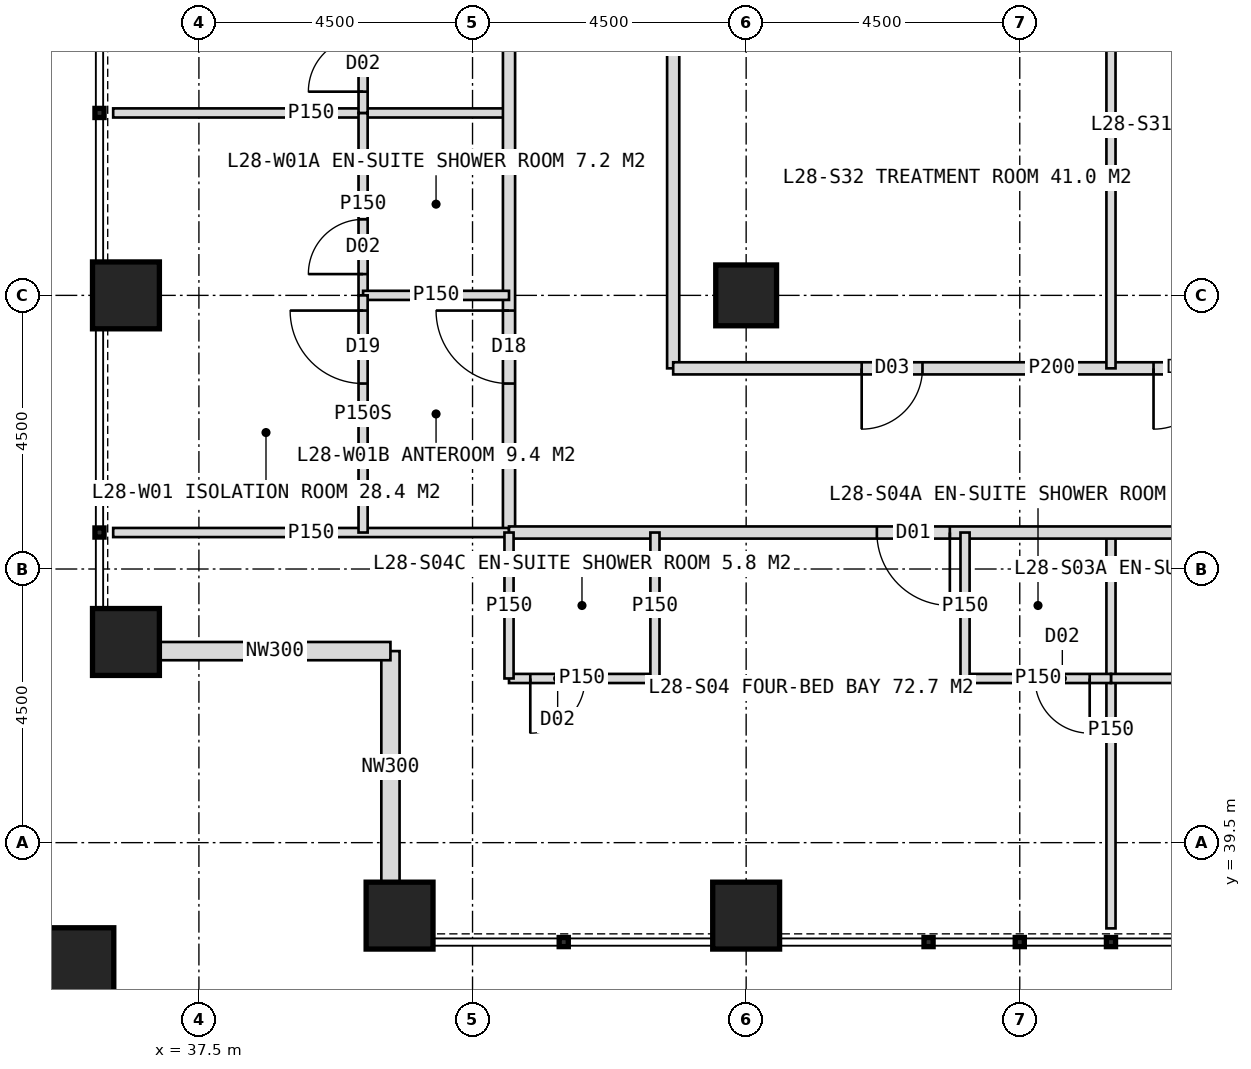
"""IFC4 building model, lengths in metres.
Left out: names, types, materials, properties, quantities, classifications, styles, units other than length and angle.
Written with IfcOpenShell. Run it as: python <this file> out.ifc"""

import sys

from ifc_helpers import new_model, si_unit, direction, frame, frame_2d, origin, origin_2d, place, context, subcontext, project, spatial, rectangle, hollow_rectangle, extrude, element, fill, save


model = new_model("IFC4")
c1 = context("Model", 3, precision=1e-05, world=origin(), true_north=direction((0.0, 1.0)))
c2 = subcontext(c1, "Body", "Model", "MODEL_VIEW")
j1 = project(units=[si_unit("LENGTHUNIT", "METRE"), si_unit("PLANEANGLEUNIT", "RADIAN")], contexts=[c1])
p1 = place(None, origin())
s1 = spatial("IfcSite", under=j1, at=p1, CompositionType="ELEMENT")
p2 = place(p1, origin())
s2 = spatial("IfcBuilding", under=s1, at=p2, CompositionType="ELEMENT")
p3 = place(p2, frame((0.0, 0.0, 120.0)))
s3 = spatial("IfcBuildingStorey", under=s2, at=p3, CompositionType="ELEMENT", Elevation=120.0)
p4 = place(p3, frame((46.5, 48.5, 0.0), z_axis=(0.0, 0.0, 1.0), x_axis=(1.0, 0.0, 0.0)))
e1 = element("IfcColumn", 1, at=p4, inside=s3, PredefinedType="COLUMN", context=c2, shape_type="SweptSolid", body=[
    extrude(hollow_rectangle(XDim=1.0, YDim=1.0, WallThickness=0.1, at=origin_2d()), origin(), (0.0, 0.0, 1.0), 4.0),
])
for number, where, z_axis, x_axis in (
    (2, (40.8, 38.3, 0.0), (0.0, 0.0, 1.0), (1.0, 0.0, 0.0)),
    (3, (36.3, 42.8, 0.0), (0.0, 0.0, 1.0), (1.0, 0.0, 0.0)),
    (4, (46.5, 38.3, 0.0), (0.0, 0.0, 1.0), (1.0, 0.0, 0.0)),
    (5, (36.3, 48.5, 0.0), (0.0, 0.0, 1.0), (1.0, 0.0, 0.0)),
):
    element("IfcColumn", number, at=place(p3, frame(where, z_axis=z_axis, x_axis=x_axis)), inside=s3, PredefinedType="COLUMN", context=c2, shape_type="SweptSolid", body=[
        extrude(hollow_rectangle(XDim=1.1, YDim=1.1, WallThickness=0.1, at=origin_2d()), origin(), (0.0, 0.0, 1.0), 4.0),
    ])
p5 = place(p3, frame((35.4, 37.4, 0.0), z_axis=(0.0, 0.0, 1.0), x_axis=(1.0, 0.0, 0.0)))
e6 = element("IfcColumn", 6, at=p5, inside=s3, PredefinedType="COLUMN", context=c2, shape_type="SweptSolid", body=[
    extrude(hollow_rectangle(XDim=1.4, YDim=1.4, WallThickness=0.08, at=origin_2d()), origin(), (0.0, 0.0, 1.0), 4.0),
])
for number, where, z_axis, x_axis in (
    (7, (40.65, 38.85, 0.0), (0.0, 0.0, 1.0), (0.0, 1.0, 0.0)),
    (8, (40.65, 42.65, 0.0), (0.0, 0.0, 1.0), (-1.0, 0.0, 0.0)),
):
    element("IfcWall", number, at=place(p3, frame(where, z_axis=z_axis, x_axis=x_axis)), inside=s3, PredefinedType="ELEMENTEDWALL", context=c2, shape_type="SweptSolid", body=[
        extrude(rectangle(XDim=3.8, YDim=0.3, at=frame_2d((1.9, 0.0))), origin(), (0.0, 0.0, 1.0), 4.0),
    ])
p6 = place(p3, frame((42.6, 51.5, 0.0), z_axis=(0.0, 0.0, 1.0), x_axis=(-1.0, 0.0, 0.0)))
e9 = element("IfcWall", 9, at=p6, inside=s3, PredefinedType="PARTITIONING", context=c2, shape_type="SweptSolid", body=[
    extrude(rectangle(XDim=6.51, YDim=0.15, at=frame_2d((3.255, 0.0))), origin(), (0.0, 0.0, 1.0), 3.75),
])
p7 = place(p3, frame((42.6, 44.6, 0.0), z_axis=(0.0, 0.0, 1.0), x_axis=(0.0, 1.0, 0.0)))
e10 = element("IfcWall", 10, at=p7, inside=s3, PredefinedType="PARTITIONING", context=c2, shape_type="SweptSolid", body=[
    extrude(rectangle(XDim=34.8, YDim=0.2, at=frame_2d((17.4, 0.0))), origin(), (0.0, 0.0, 1.0), 3.75),
])
p8 = place(p7, frame((2.45, 0.0, 0.0)))
e11 = element("IfcOpeningElement", 11, at=p8, cuts=e10, PredefinedType="OPENING", context=c2, shape_type="SweptSolid", body=[
    extrude(rectangle(XDim=1.2, YDim=2.2, at=frame_2d((0.6, 1.1))), frame((0.0, 0.11, 0.0), z_axis=(0.0, -1.0, 0.0), x_axis=(1.0, 0.0, 0.0)), (0.0, 0.0, 1.0), 0.22),
])
p9 = place(p7, frame((10.15, 0.0, 0.0)))
e12 = element("IfcOpeningElement", 12, at=p9, cuts=e10, PredefinedType="OPENING", context=c2, shape_type="SweptSolid", body=[
    extrude(rectangle(XDim=1.2, YDim=2.2, at=frame_2d((0.6, 1.1))), frame((0.0, 0.11, 0.0), z_axis=(0.0, -1.0, 0.0), x_axis=(1.0, 0.0, 0.0)), (0.0, 0.0, 1.0), 0.22),
])
p10 = place(p7, frame((23.45, 0.0, 0.0)))
e13 = element("IfcOpeningElement", 13, at=p10, cuts=e10, PredefinedType="OPENING", context=c2, shape_type="SweptSolid", body=[
    extrude(rectangle(XDim=1.2, YDim=2.2, at=frame_2d((0.6, 1.1))), frame((0.0, 0.11, 0.0), z_axis=(0.0, -1.0, 0.0), x_axis=(1.0, 0.0, 0.0)), (0.0, 0.0, 1.0), 0.22),
])
p11 = place(p7, frame((30.55, 0.0, 0.0)))
e14 = element("IfcOpeningElement", 14, at=p11, cuts=e10, PredefinedType="OPENING", context=c2, shape_type="SweptSolid", body=[
    extrude(rectangle(XDim=1.2, YDim=2.2, at=frame_2d((0.6, 1.1))), frame((0.0, 0.11, 0.0), z_axis=(0.0, -1.0, 0.0), x_axis=(1.0, 0.0, 0.0)), (0.0, 0.0, 1.0), 0.22),
])
p12 = place(p3, frame((42.6, 44.6, 0.0), z_axis=(0.0, 0.0, 1.0), x_axis=(-1.0, 0.0, 0.0)))
e15 = element("IfcWall", 15, at=p12, inside=s3, PredefinedType="PARTITIONING", context=c2, shape_type="SweptSolid", body=[
    extrude(rectangle(XDim=6.51, YDim=0.15, at=frame_2d((3.255, 0.0))), origin(), (0.0, 0.0, 1.0), 3.75),
])
p13 = place(p3, frame((40.2, 48.5, 0.0), z_axis=(0.0, 0.0, 1.0), x_axis=(0.0, 1.0, 0.0)))
e16 = element("IfcWall", 16, at=p13, inside=s3, PredefinedType="PARTITIONING", context=c2, shape_type="SweptSolid", body=[
    extrude(rectangle(XDim=3.0, YDim=0.15, at=frame_2d((1.5, 0.0))), origin(), (0.0, 0.0, 1.0), 3.75),
])
p14 = place(p13, frame((0.35, 0.0, 0.0)))
e17 = element("IfcOpeningElement", 17, at=p14, cuts=e16, PredefinedType="OPENING", context=c2, shape_type="SweptSolid", body=[
    extrude(rectangle(XDim=0.9, YDim=2.1, at=frame_2d((0.45, 1.05))), frame((0.0, 0.085, 0.0), z_axis=(0.0, -1.0, 0.0), x_axis=(1.0, 0.0, 0.0)), (0.0, 0.0, 1.0), 0.17),
])
p15 = place(p3, frame((42.6, 48.5, 0.0), z_axis=(0.0, 0.0, 1.0), x_axis=(-1.0, 0.0, 0.0)))
e18 = element("IfcWall", 18, at=p15, inside=s3, PredefinedType="PARTITIONING", context=c2, shape_type="SweptSolid", body=[
    extrude(rectangle(XDim=2.4, YDim=0.15, at=frame_2d((1.2, 0.0))), origin(), (0.0, 0.0, 1.0), 2.95),
])
p16 = place(p3, frame((40.2, 44.6, 0.0), z_axis=(0.0, 0.0, 1.0), x_axis=(0.0, 1.0, 0.0)))
e19 = element("IfcWall", 19, at=p16, inside=s3, PredefinedType="PARTITIONING", context=c2, shape_type="SweptSolid", body=[
    extrude(rectangle(XDim=3.9, YDim=0.15, at=frame_2d((1.95, 0.0))), origin(), (0.0, 0.0, 1.0), 3.75),
])
p17 = place(p16, frame((2.45, 0.0, 0.0)))
e20 = element("IfcOpeningElement", 20, at=p17, cuts=e19, PredefinedType="OPENING", context=c2, shape_type="SweptSolid", body=[
    extrude(rectangle(XDim=1.2, YDim=2.2, at=frame_2d((0.6, 1.1))), frame((0.0, 0.085, 0.0), z_axis=(0.0, -1.0, 0.0), x_axis=(1.0, 0.0, 0.0)), (0.0, 0.0, 1.0), 0.17),
])
p18 = place(p3, frame((40.2, 51.5, 0.0), z_axis=(0.0, 0.0, 1.0), x_axis=(0.0, 1.0, 0.0)))
e21 = element("IfcWall", 21, at=p18, inside=s3, PredefinedType="PARTITIONING", context=c2, shape_type="SweptSolid", body=[
    extrude(rectangle(XDim=3.0, YDim=0.15, at=frame_2d((1.5, 0.0))), origin(), (0.0, 0.0, 1.0), 3.75),
])
p19 = place(p18, frame((0.35, 0.0, 0.0)))
e22 = element("IfcOpeningElement", 22, at=p19, cuts=e21, PredefinedType="OPENING", context=c2, shape_type="SweptSolid", body=[
    extrude(rectangle(XDim=0.9, YDim=2.1, at=frame_2d((0.45, 1.05))), frame((0.0, 0.085, 0.0), z_axis=(0.0, -1.0, 0.0), x_axis=(1.0, 0.0, 0.0)), (0.0, 0.0, 1.0), 0.17),
])
p20 = place(p3, frame((45.3, 47.3, 0.0), z_axis=(0.0, 0.0, 1.0), x_axis=(0.0, 1.0, 0.0)))
e23 = element("IfcWall", 23, at=p20, inside=s3, PredefinedType="PARTITIONING", context=c2, shape_type="SweptSolid", body=[
    extrude(rectangle(XDim=10.7, YDim=0.2, at=frame_2d((5.35, 0.0))), origin(), (0.0, 0.0, 1.0), 3.75),
])
p21 = place(p20, frame((6.5, 0.0, 0.0)))
e24 = element("IfcOpeningElement", 24, at=p21, cuts=e23, PredefinedType="OPENING", context=c2, shape_type="SweptSolid", body=[
    extrude(rectangle(XDim=0.9, YDim=2.1, at=frame_2d((0.45, 1.05))), frame((0.0, 0.11, 0.0), z_axis=(0.0, -1.0, 0.0), x_axis=(1.0, 0.0, 0.0)), (0.0, 0.0, 1.0), 0.22),
])
p22 = place(p20, frame((8.45, 0.0, 0.0)))
e25 = element("IfcOpeningElement", 25, at=p22, cuts=e23, PredefinedType="OPENING", context=c2, shape_type="SweptSolid", body=[
    extrude(rectangle(XDim=0.9, YDim=2.1, at=frame_2d((0.45, 1.05))), frame((0.0, 0.11, 0.0), z_axis=(0.0, -1.0, 0.0), x_axis=(1.0, 0.0, 0.0)), (0.0, 0.0, 1.0), 0.22),
])
p23 = place(p3, frame((52.5, 44.6, 0.0), z_axis=(0.0, 0.0, 1.0), x_axis=(0.0, -1.0, 0.0)))
e26 = element("IfcWall", 26, at=p23, inside=s3, PredefinedType="PARTITIONING", context=c2, shape_type="SweptSolid", body=[
    extrude(rectangle(XDim=6.51, YDim=0.15, at=frame_2d((3.255, 0.0))), origin(), (0.0, 0.0, 1.0), 3.75),
])
p24 = place(p3, frame((77.4, 44.6, 0.0), z_axis=(0.0, 0.0, 1.0), x_axis=(-1.0, 0.0, 0.0)))
e27 = element("IfcWall", 27, at=p24, inside=s3, PredefinedType="PARTITIONING", context=c2, shape_type="SweptSolid", body=[
    extrude(rectangle(XDim=34.8, YDim=0.2, at=frame_2d((17.4, 0.0))), origin(), (0.0, 0.0, 1.0), 3.75),
])
p25 = place(p24, frame((2.45, 0.0, 0.0)))
e28 = element("IfcOpeningElement", 28, at=p25, cuts=e27, PredefinedType="OPENING", context=c2, shape_type="SweptSolid", body=[
    extrude(rectangle(XDim=1.2, YDim=2.2, at=frame_2d((0.6, 1.1))), frame((0.0, 0.11, 0.0), z_axis=(0.0, -1.0, 0.0), x_axis=(1.0, 0.0, 0.0)), (0.0, 0.0, 1.0), 0.22),
])
p26 = place(p24, frame((10.15, 0.0, 0.0)))
e29 = element("IfcOpeningElement", 29, at=p26, cuts=e27, PredefinedType="OPENING", context=c2, shape_type="SweptSolid", body=[
    extrude(rectangle(XDim=1.2, YDim=2.2, at=frame_2d((0.6, 1.1))), frame((0.0, 0.11, 0.0), z_axis=(0.0, -1.0, 0.0), x_axis=(1.0, 0.0, 0.0)), (0.0, 0.0, 1.0), 0.22),
])
p27 = place(p24, frame((20.45, 0.0, 0.0)))
e30 = element("IfcOpeningElement", 30, at=p27, cuts=e27, PredefinedType="OPENING", context=c2, shape_type="SweptSolid", body=[
    extrude(rectangle(XDim=1.2, YDim=2.2, at=frame_2d((0.6, 1.1))), frame((0.0, 0.11, 0.0), z_axis=(0.0, -1.0, 0.0), x_axis=(1.0, 0.0, 0.0)), (0.0, 0.0, 1.0), 0.22),
])
p28 = place(p24, frame((27.55, 0.0, 0.0)))
e31 = element("IfcOpeningElement", 31, at=p28, cuts=e27, PredefinedType="OPENING", context=c2, shape_type="SweptSolid", body=[
    extrude(rectangle(XDim=1.2, YDim=2.2, at=frame_2d((0.6, 1.1))), frame((0.0, 0.11, 0.0), z_axis=(0.0, -1.0, 0.0), x_axis=(1.0, 0.0, 0.0)), (0.0, 0.0, 1.0), 0.22),
])
p29 = place(p3, frame((55.5, 42.2, 0.0), z_axis=(0.0, 0.0, 1.0), x_axis=(-1.0, 0.0, 0.0)))
e32 = element("IfcWall", 32, at=p29, inside=s3, PredefinedType="PARTITIONING", context=c2, shape_type="SweptSolid", body=[
    extrude(rectangle(XDim=3.0, YDim=0.15, at=frame_2d((1.5, 0.0))), origin(), (0.0, 0.0, 1.0), 3.75),
])
p30 = place(p29, frame((0.35, 0.0, 0.0)))
e33 = element("IfcOpeningElement", 33, at=p30, cuts=e32, PredefinedType="OPENING", context=c2, shape_type="SweptSolid", body=[
    extrude(rectangle(XDim=0.9, YDim=2.1, at=frame_2d((0.45, 1.05))), frame((0.0, 0.085, 0.0), z_axis=(0.0, -1.0, 0.0), x_axis=(1.0, 0.0, 0.0)), (0.0, 0.0, 1.0), 0.17),
])
p31 = place(p3, frame((52.5, 42.2, 0.0), z_axis=(0.0, 0.0, 1.0), x_axis=(-1.0, 0.0, 0.0)))
e34 = element("IfcWall", 34, at=p31, inside=s3, PredefinedType="PARTITIONING", context=c2, shape_type="SweptSolid", body=[
    extrude(rectangle(XDim=2.4, YDim=0.15, at=frame_2d((1.2, 0.0))), origin(), (0.0, 0.0, 1.0), 3.75),
])
p32 = place(p31, frame((0.35, 0.0, 0.0)))
e35 = element("IfcOpeningElement", 35, at=p32, cuts=e34, PredefinedType="OPENING", context=c2, shape_type="SweptSolid", body=[
    extrude(rectangle(XDim=0.9, YDim=2.1, at=frame_2d((0.45, 1.05))), frame((0.0, 0.085, 0.0), z_axis=(0.0, -1.0, 0.0), x_axis=(1.0, 0.0, 0.0)), (0.0, 0.0, 1.0), 0.17),
])
p33 = place(p3, frame((50.1, 44.6, 0.0), z_axis=(0.0, 0.0, 1.0), x_axis=(0.0, -1.0, 0.0)))
e36 = element("IfcWall", 36, at=p33, inside=s3, PredefinedType="PARTITIONING", context=c2, shape_type="SweptSolid", body=[
    extrude(rectangle(XDim=2.4, YDim=0.15, at=frame_2d((1.2, 0.0))), origin(), (0.0, 0.0, 1.0), 3.75),
])
p34 = place(p3, frame((45.0, 42.2, 0.0), z_axis=(0.0, 0.0, 1.0), x_axis=(-1.0, 0.0, 0.0)))
e37 = element("IfcWall", 37, at=p34, inside=s3, PredefinedType="PARTITIONING", context=c2, shape_type="SweptSolid", body=[
    extrude(rectangle(XDim=2.4, YDim=0.15, at=frame_2d((1.2, 0.0))), origin(), (0.0, 0.0, 1.0), 3.75),
])
p35 = place(p34, frame((1.15, 0.0, 0.0)))
e38 = element("IfcOpeningElement", 38, at=p35, cuts=e37, PredefinedType="OPENING", context=c2, shape_type="SweptSolid", body=[
    extrude(rectangle(XDim=0.9, YDim=2.1, at=frame_2d((0.45, 1.05))), frame((0.0, 0.085, 0.0), z_axis=(0.0, -1.0, 0.0), x_axis=(1.0, 0.0, 0.0)), (0.0, 0.0, 1.0), 0.17),
])
for number, where, z_axis, x_axis in (
    (39, (45.0, 44.6, 0.0), (0.0, 0.0, 1.0), (0.0, -1.0, 0.0)),
    (40, (42.6, 44.6, 0.0), (0.0, 0.0, 1.0), (0.0, -1.0, 0.0)),
):
    element("IfcWall", number, at=place(p3, frame(where, z_axis=z_axis, x_axis=x_axis)), inside=s3, PredefinedType="PARTITIONING", context=c2, shape_type="SweptSolid", body=[
        extrude(rectangle(XDim=2.4, YDim=0.15, at=frame_2d((1.2, 0.0))), origin(), (0.0, 0.0, 1.0), 3.75),
    ])
p36 = place(p3, frame((57.75, 47.3, 0.0), z_axis=(0.0, 0.0, 1.0), x_axis=(-1.0, 0.0, 0.0)))
e41 = element("IfcWall", 41, at=p36, inside=s3, PredefinedType="PARTITIONING", context=c2, shape_type="SweptSolid", body=[
    extrude(rectangle(XDim=12.45, YDim=0.2, at=frame_2d((6.225, 0.0))), origin(), (0.0, 0.0, 1.0), 3.75),
])
p37 = place(p36, frame((3.55, 0.0, 0.0)))
e42 = element("IfcOpeningElement", 42, at=p37, cuts=e41, PredefinedType="OPENING", context=c2, shape_type="SweptSolid", body=[
    extrude(rectangle(XDim=1.0, YDim=2.1, at=frame_2d((0.5, 1.05))), frame((0.0, 0.11, 0.0), z_axis=(0.0, -1.0, 0.0), x_axis=(1.0, 0.0, 0.0)), (0.0, 0.0, 1.0), 0.22),
])
p38 = place(p36, frame((8.35, 0.0, 0.0)))
e43 = element("IfcOpeningElement", 43, at=p38, cuts=e41, PredefinedType="OPENING", context=c2, shape_type="SweptSolid", body=[
    extrude(rectangle(XDim=1.0, YDim=2.1, at=frame_2d((0.5, 1.05))), frame((0.0, 0.11, 0.0), z_axis=(0.0, -1.0, 0.0), x_axis=(1.0, 0.0, 0.0)), (0.0, 0.0, 1.0), 0.22),
])
p39 = place(p3, frame((52.5, 53.0, 0.0), z_axis=(0.0, 0.0, 1.0), x_axis=(0.0, -1.0, 0.0)))
e44 = element("IfcWall", 44, at=p39, inside=s3, PredefinedType="PARTITIONING", context=c2, shape_type="SweptSolid", body=[
    extrude(rectangle(XDim=5.7, YDim=0.15, at=frame_2d((2.85, 0.0))), origin(), (0.0, 0.0, 1.0), 3.75),
])
p40 = place(p17, origin())
e45 = element("IfcDoor", 45, at=p40, inside=s3, OperationType="SINGLE_SWING_RIGHT", PredefinedType="DOOR", context=c2, shape_type="SweptSolid", body=[
    extrude(rectangle(XDim=1.2, YDim=2.2, at=frame_2d((0.6, 1.1))), frame((0.0, 0.025, 0.0), z_axis=(0.0, -1.0, 0.0), x_axis=(1.0, 0.0, 0.0)), (0.0, 0.0, 1.0), 0.05),
])
fill(e20, e45)
p41 = place(p8, origin())
e46 = element("IfcDoor", 46, at=p41, inside=s3, OperationType="SINGLE_SWING_RIGHT", PredefinedType="DOOR", context=c2, shape_type="SweptSolid", body=[
    extrude(rectangle(XDim=1.2, YDim=2.2, at=frame_2d((0.6, 1.1))), frame((0.0, 0.025, 0.0), z_axis=(0.0, -1.0, 0.0), x_axis=(1.0, 0.0, 0.0)), (0.0, 0.0, 1.0), 0.05),
])
fill(e11, e46)
p42 = place(p14, origin())
e47 = element("IfcDoor", 47, at=p42, inside=s3, OperationType="SINGLE_SWING_LEFT", PredefinedType="DOOR", context=c2, shape_type="SweptSolid", body=[
    extrude(rectangle(XDim=0.9, YDim=2.1, at=frame_2d((0.45, 1.05))), frame((0.0, 0.025, 0.0), z_axis=(0.0, -1.0, 0.0), x_axis=(1.0, 0.0, 0.0)), (0.0, 0.0, 1.0), 0.05),
])
fill(e17, e47)
p43 = place(p19, origin())
e48 = element("IfcDoor", 48, at=p43, inside=s3, OperationType="SINGLE_SWING_LEFT", PredefinedType="DOOR", context=c2, shape_type="SweptSolid", body=[
    extrude(rectangle(XDim=0.9, YDim=2.1, at=frame_2d((0.45, 1.05))), frame((0.0, 0.025, 0.0), z_axis=(0.0, -1.0, 0.0), x_axis=(1.0, 0.0, 0.0)), (0.0, 0.0, 1.0), 0.05),
])
fill(e22, e48)
p44 = place(p28, origin())
e49 = element("IfcDoor", 49, at=p44, inside=s3, OperationType="SINGLE_SWING_LEFT", PredefinedType="DOOR", context=c2, shape_type="SweptSolid", body=[
    extrude(rectangle(XDim=1.2, YDim=2.2, at=frame_2d((0.6, 1.1))), frame((0.0, 0.025, 0.0), z_axis=(0.0, -1.0, 0.0), x_axis=(1.0, 0.0, 0.0)), (0.0, 0.0, 1.0), 0.05),
])
fill(e31, e49)
p45 = place(p32, origin())
e50 = element("IfcDoor", 50, at=p45, inside=s3, OperationType="SINGLE_SWING_LEFT", PredefinedType="DOOR", context=c2, shape_type="SweptSolid", body=[
    extrude(rectangle(XDim=0.9, YDim=2.1, at=frame_2d((0.45, 1.05))), frame((0.0, 0.025, 0.0), z_axis=(0.0, -1.0, 0.0), x_axis=(1.0, 0.0, 0.0)), (0.0, 0.0, 1.0), 0.05),
])
fill(e35, e50)
p46 = place(p35, origin())
e51 = element("IfcDoor", 51, at=p46, inside=s3, OperationType="SINGLE_SWING_RIGHT", PredefinedType="DOOR", context=c2, shape_type="SweptSolid", body=[
    extrude(rectangle(XDim=0.9, YDim=2.1, at=frame_2d((0.45, 1.05))), frame((0.0, 0.025, 0.0), z_axis=(0.0, -1.0, 0.0), x_axis=(1.0, 0.0, 0.0)), (0.0, 0.0, 1.0), 0.05),
])
fill(e38, e51)
p47 = place(p37, origin())
e52 = element("IfcDoor", 52, at=p47, inside=s3, OperationType="SINGLE_SWING_RIGHT", PredefinedType="DOOR", context=c2, shape_type="SweptSolid", body=[
    extrude(rectangle(XDim=1.0, YDim=2.1, at=frame_2d((0.5, 1.05))), frame((0.0, 0.025, 0.0), z_axis=(0.0, -1.0, 0.0), x_axis=(1.0, 0.0, 0.0)), (0.0, 0.0, 1.0), 0.05),
])
fill(e42, e52)
p48 = place(p38, origin())
e53 = element("IfcDoor", 53, at=p48, inside=s3, OperationType="SINGLE_SWING_RIGHT", PredefinedType="DOOR", context=c2, shape_type="SweptSolid", body=[
    extrude(rectangle(XDim=1.0, YDim=2.1, at=frame_2d((0.5, 1.05))), frame((0.0, 0.025, 0.0), z_axis=(0.0, -1.0, 0.0), x_axis=(1.0, 0.0, 0.0)), (0.0, 0.0, 1.0), 0.05),
])
fill(e43, e53)
save(model, sys.argv[1])
